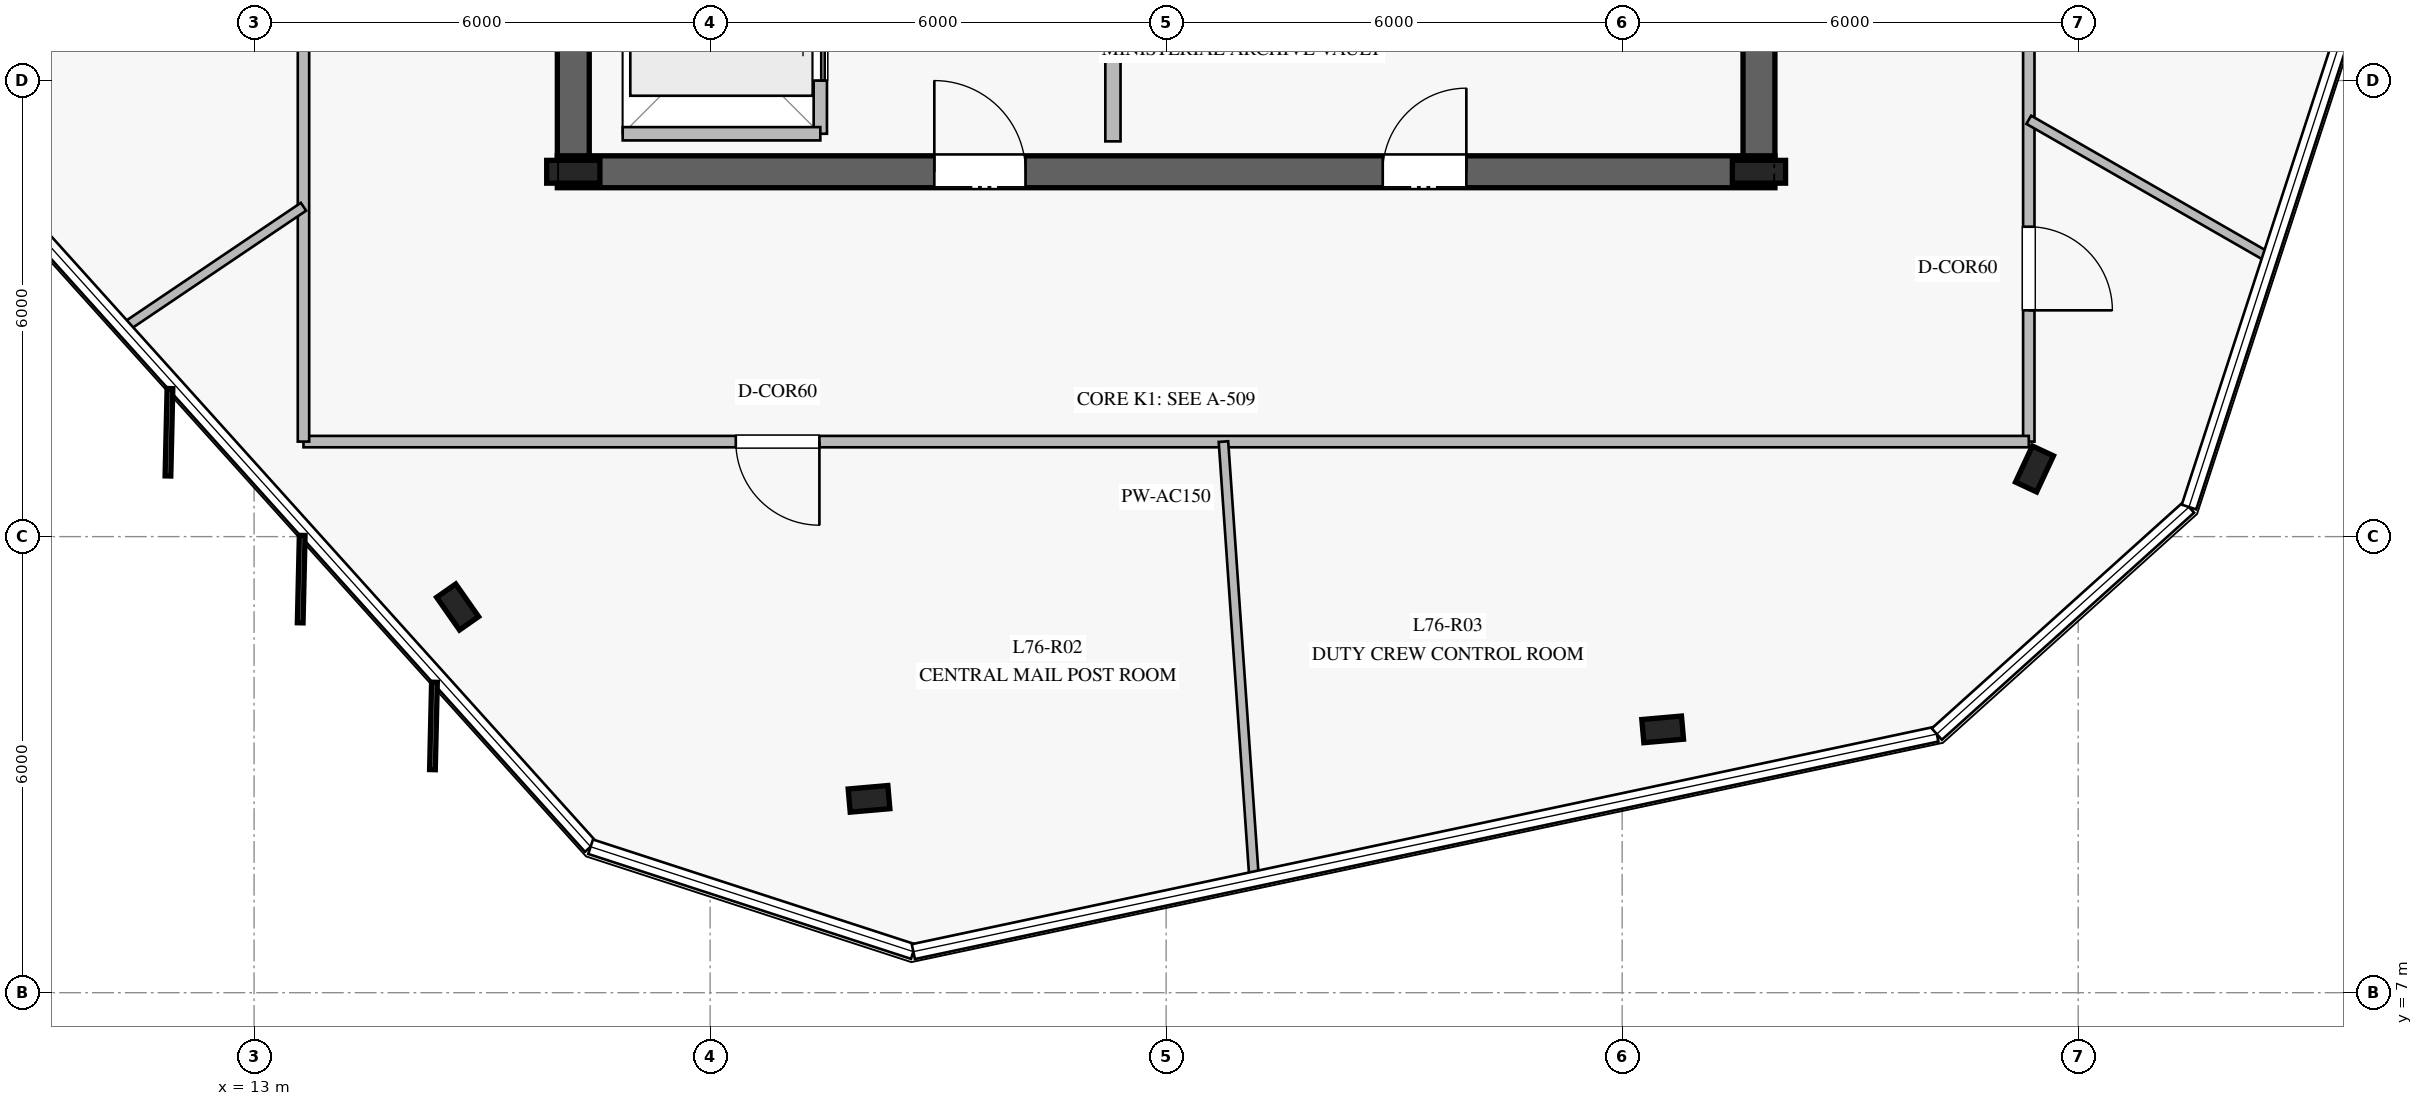
"""IFC4 building model, lengths in metres.
Left out: names, types, materials, properties, quantities, classifications, styles, units other than length and angle.
Written with IfcOpenShell. Run it as: python <this file> out.ifc"""

import sys

from ifc_helpers import new_model, si_unit, direction, frame, frame_2d, origin, origin_2d, place, context, subcontext, project, spatial, rectangle, i_section, extrude, element, fill, save


model = new_model("IFC4")
c1 = context("Model", 3, precision=1e-05, world=origin(), true_north=direction((0.0, 1.0)))
c2 = subcontext(c1, "Body", "Model", "MODEL_VIEW")
j1 = project(units=[si_unit("LENGTHUNIT", "METRE"), si_unit("PLANEANGLEUNIT", "RADIAN")], contexts=[c1])
p1 = place(None, origin())
s1 = spatial("IfcSite", under=j1, at=p1, CompositionType="ELEMENT")
p2 = place(p1, origin())
s2 = spatial("IfcBuilding", under=s1, at=p2, CompositionType="ELEMENT")
p3 = place(p2, frame((0.0, 0.0, 314.2)))
s3 = spatial("IfcBuildingStorey", under=s2, at=p3, CompositionType="ELEMENT", Elevation=314.2)
p4 = place(p3, frame((16.99, 17.8, 0.0), z_axis=(0.0, 0.0, 1.0), x_axis=(1.0, 0.0, 0.0)))
e1 = element("IfcWall", 1, at=p4, inside=s3, PredefinedType="SHEAR", context=c2, shape_type="SweptSolid", body=[
    extrude(rectangle(XDim=16.02, YDim=0.42, at=frame_2d((8.01, 0.0))), origin(), (0.0, 0.0, 1.0), 3.74),
])
p5 = place(p4, frame((4.96, 0.0, 0.0)))
e2 = element("IfcOpeningElement", 2, at=p5, cuts=e1, PredefinedType="OPENING", context=c2, shape_type="SweptSolid", body=[
    extrude(rectangle(XDim=1.2, YDim=2.25, at=frame_2d((0.6, 1.125))), frame((0.0, 0.22, 0.0), z_axis=(0.0, -1.0, 0.0), x_axis=(1.0, 0.0, 0.0)), (0.0, 0.0, 1.0), 0.44),
])
p6 = place(p4, frame((10.86, 0.0, 0.0)))
e3 = element("IfcOpeningElement", 3, at=p6, cuts=e1, PredefinedType="OPENING", context=c2, shape_type="SweptSolid", body=[
    extrude(rectangle(XDim=1.1, YDim=2.2, at=frame_2d((0.55, 1.1))), frame((0.0, 0.22, 0.0), z_axis=(0.0, -1.0, 0.0), x_axis=(1.0, 0.0, 0.0)), (0.0, 0.0, 1.0), 0.44),
])
p7 = place(p3, frame((17.2, 31.99, 0.0), z_axis=(0.0, 0.0, 1.0), x_axis=(0.0, -1.0, 0.0)))
e4 = element("IfcWall", 4, at=p7, inside=s3, PredefinedType="SHEAR", context=c2, shape_type="SweptSolid", body=[
    extrude(rectangle(XDim=13.98, YDim=0.42, at=frame_2d((6.99, 0.0))), origin(), (0.0, 0.0, 1.0), 3.74),
])
p8 = place(p7, frame((2.14, 0.0, 0.0)))
e5 = element("IfcOpeningElement", 5, at=p8, cuts=e4, PredefinedType="OPENING", context=c2, shape_type="SweptSolid", body=[
    extrude(rectangle(XDim=1.5, YDim=2.2, at=frame_2d((0.75, 1.1))), frame((0.0, 0.22, 0.0), z_axis=(0.0, -1.0, 0.0), x_axis=(1.0, 0.0, 0.0)), (0.0, 0.0, 1.0), 0.44),
])
p9 = place(p3, frame((32.8, 18.01, 0.0), z_axis=(0.0, 0.0, 1.0), x_axis=(0.0, 1.0, 0.0)))
e6 = element("IfcWall", 6, at=p9, inside=s3, PredefinedType="SHEAR", context=c2, shape_type="SweptSolid", body=[
    extrude(rectangle(XDim=13.98, YDim=0.42, at=frame_2d((6.99, 0.0))), origin(), (0.0, 0.0, 1.0), 3.74),
])
for number, where, z_axis, x_axis in (
    (7, (17.2, 17.8, 0.0), (0.0, 0.0, 1.0), (1.0, 0.0, 0.0)),
    (8, (32.8, 17.8, 0.0), (0.0, 0.0, 1.0), (1.0, 0.0, 0.0)),
):
    element("IfcColumn", number, at=place(p3, frame(where, z_axis=z_axis, x_axis=x_axis)), inside=s3, PredefinedType="COLUMN", context=c2, shape_type="SweptSolid", body=[
        extrude(i_section(OverallWidth=0.3, OverallDepth=0.7, WebThickness=0.017, FlangeThickness=0.032, at=origin_2d()), origin(), (0.0, 0.0, 1.0), 4.0),
    ])
for number, where, z_axis, x_axis in (
    (9, (15.678, 12.074, 0.0), (0.0, 0.0, 1.0), (-0.574, 0.819, 0.0)),
    (10, (21.091, 9.55, 0.0), (0.0, 0.0, 1.0), (0.996, 0.087, 0.0)),
    (11, (31.533, 10.464, 0.0), (0.0, 0.0, 1.0), (0.996, 0.087, 0.0)),
    (12, (36.425, 13.89, 0.0), (0.0, 0.0, 1.0), (0.423, 0.906, 0.0)),
):
    element("IfcColumn", number, at=place(p3, frame(where, z_axis=z_axis, x_axis=x_axis)), inside=s3, PredefinedType="COLUMN", context=c2, shape_type="SweptSolid", body=[
        extrude(i_section(OverallWidth=0.306, OverallDepth=0.524, WebThickness=0.021, FlangeThickness=0.04, at=origin_2d()), origin(), (0.0, 0.0, 1.0), 4.0),
    ])
p10 = place(p3, frame((24.3, 18.2, 0.0), z_axis=(0.0, 0.0, 1.0), x_axis=(0.0, 1.0, 0.0)))
e13 = element("IfcWall", 13, at=p10, inside=s3, PredefinedType="PARTITIONING", context=c2, shape_type="SweptSolid", body=[
    extrude(rectangle(XDim=5.15, YDim=0.2, at=frame_2d((2.575, 0.0))), origin(), (0.0, 0.0, 1.0), 3.74),
])
p11 = place(p3, frame((20.45, 18.3, 0.0), z_axis=(0.0, 0.0, 1.0), x_axis=(0.0, 1.0, 0.0)))
e14 = element("IfcWall", 14, at=p11, inside=s3, PredefinedType="PARTITIONING", context=c2, shape_type="SweptSolid", body=[
    extrude(rectangle(XDim=2.6, YDim=0.175, at=frame_2d((1.3, 0.0))), origin(), (0.0, 0.0, 1.0), 3.74),
])
p12 = place(p11, frame((0.7, 0.0, 0.0)))
e15 = element("IfcOpeningElement", 15, at=p12, cuts=e14, PredefinedType="OPENING", context=c2, shape_type="SweptSolid", body=[
    extrude(rectangle(XDim=1.2, YDim=2.2, at=frame_2d((0.6, 1.1))), frame((0.0, 0.098, 0.0), z_axis=(0.0, -1.0, 0.0), x_axis=(1.0, 0.0, 0.0)), (0.0, 0.0, 1.0), 0.195),
])
p13 = place(p3, frame((17.85, 18.3, 0.0), z_axis=(0.0, 0.0, 1.0), x_axis=(1.0, 0.0, 0.0)))
e16 = element("IfcWall", 16, at=p13, inside=s3, PredefinedType="PARTITIONING", context=c2, shape_type="SweptSolid", body=[
    extrude(rectangle(XDim=2.6, YDim=0.175, at=frame_2d((1.3, 0.0))), origin(), (0.0, 0.0, 1.0), 3.74),
])
p14 = place(p3, frame((36.35, 35.75, 0.0), z_axis=(0.0, 0.0, 1.0), x_axis=(0.0, -1.0, 0.0)))
e17 = element("IfcWall", 17, at=p14, inside=s3, PredefinedType="PARTITIONING", context=c2, shape_type="SweptSolid", body=[
    extrude(rectangle(XDim=21.5, YDim=0.15, at=frame_2d((10.75, 0.0))), origin(), (0.0, 0.0, 1.0), 3.24),
])
p15 = place(p14, frame((18.673, 0.0, 0.0)))
e18 = element("IfcOpeningElement", 18, at=p15, cuts=e17, PredefinedType="OPENING", context=c2, shape_type="SweptSolid", body=[
    extrude(rectangle(XDim=1.1, YDim=2.2, at=frame_2d((0.55, 1.1))), frame((0.0, 0.085, 0.0), z_axis=(0.0, -1.0, 0.0), x_axis=(1.0, 0.0, 0.0)), (0.0, 0.0, 1.0), 0.17),
])
p16 = place(p14, frame((10.163, 0.0, 0.0)))
e19 = element("IfcOpeningElement", 19, at=p16, cuts=e17, PredefinedType="OPENING", context=c2, shape_type="SweptSolid", body=[
    extrude(rectangle(XDim=1.1, YDim=2.2, at=frame_2d((0.55, 1.1))), frame((0.0, 0.085, 0.0), z_axis=(0.0, -1.0, 0.0), x_axis=(1.0, 0.0, 0.0)), (0.0, 0.0, 1.0), 0.17),
])
p17 = place(p3, frame((36.35, 14.25, 0.0), z_axis=(0.0, 0.0, 1.0), x_axis=(-1.0, 0.0, 0.0)))
e20 = element("IfcWall", 20, at=p17, inside=s3, PredefinedType="PARTITIONING", context=c2, shape_type="SweptSolid", body=[
    extrude(rectangle(XDim=22.7, YDim=0.15, at=frame_2d((11.35, 0.0))), origin(), (0.0, 0.0, 1.0), 3.24),
])
p18 = place(p17, frame((15.912, 0.0, 0.0)))
e21 = element("IfcOpeningElement", 21, at=p18, cuts=e20, PredefinedType="OPENING", context=c2, shape_type="SweptSolid", body=[
    extrude(rectangle(XDim=1.1, YDim=2.2, at=frame_2d((0.55, 1.1))), frame((0.0, 0.085, 0.0), z_axis=(0.0, -1.0, 0.0), x_axis=(1.0, 0.0, 0.0)), (0.0, 0.0, 1.0), 0.17),
])
p19 = place(p3, frame((13.65, 14.25, 0.0), z_axis=(0.0, 0.0, 1.0), x_axis=(0.0, 1.0, 0.0)))
e22 = element("IfcWall", 22, at=p19, inside=s3, PredefinedType="PARTITIONING", context=c2, shape_type="SweptSolid", body=[
    extrude(rectangle(XDim=21.5, YDim=0.15, at=frame_2d((10.75, 0.0))), origin(), (0.0, 0.0, 1.0), 3.24),
])
p20 = place(p19, frame((8.197, 0.0, 0.0)))
e23 = element("IfcOpeningElement", 23, at=p20, cuts=e22, PredefinedType="OPENING", context=c2, shape_type="SweptSolid", body=[
    extrude(rectangle(XDim=1.1, YDim=2.2, at=frame_2d((0.55, 1.1))), frame((0.0, 0.085, 0.0), z_axis=(0.0, -1.0, 0.0), x_axis=(1.0, 0.0, 0.0)), (0.0, 0.0, 1.0), 0.17),
])
p21 = place(p3, frame((13.65, 17.34, 0.0), z_axis=(0.0, 0.0, 1.0), x_axis=(-0.828847677001, -0.559474332146, 0.0)))
e24 = element("IfcWall", 24, at=p21, inside=s3, PredefinedType="PARTITIONING", context=c2, shape_type="SweptSolid", body=[
    extrude(rectangle(XDim=2.839, YDim=0.125, at=frame_2d((1.419, 0.0))), origin(), (0.0, 0.0, 1.0), 3.24),
])
p22 = place(p3, frame((25.754, 14.25, 0.0), z_axis=(0.0, 0.0, 1.0), x_axis=(0.070038089252, -0.99754431784, 0.0)))
e25 = element("IfcWall", 25, at=p22, inside=s3, PredefinedType="PARTITIONING", context=c2, shape_type="SweptSolid", body=[
    extrude(rectangle(XDim=5.755, YDim=0.125, at=frame_2d((2.877, 0.0))), origin(), (0.0, 0.0, 1.0), 3.24),
])
p23 = place(p3, frame((36.35, 18.484, 0.0), z_axis=(0.0, 0.0, 1.0), x_axis=(0.867242910884, -0.497885261401, 0.0)))
e26 = element("IfcWall", 26, at=p23, inside=s3, PredefinedType="PARTITIONING", context=c2, shape_type="SweptSolid", body=[
    extrude(rectangle(XDim=3.641, YDim=0.125, at=frame_2d((1.821, 0.0))), origin(), (0.0, 0.0, 1.0), 3.24),
])
p24 = place(p5, origin())
e27 = element("IfcDoor", 27, at=p24, inside=s3, OperationType="SINGLE_SWING_LEFT", PredefinedType="DOOR", context=c2, shape_type="SweptSolid", body=[
    extrude(rectangle(XDim=1.2, YDim=2.25, at=frame_2d((0.6, 1.125))), frame((0.0, 0.025, 0.0), z_axis=(0.0, -1.0, 0.0), x_axis=(1.0, 0.0, 0.0)), (0.0, 0.0, 1.0), 0.05),
])
fill(e2, e27)
p25 = place(p6, origin())
e28 = element("IfcDoor", 28, at=p25, inside=s3, OperationType="SINGLE_SWING_RIGHT", PredefinedType="DOOR", context=c2, shape_type="SweptSolid", body=[
    extrude(rectangle(XDim=1.1, YDim=2.2, at=frame_2d((0.55, 1.1))), frame((0.0, 0.025, 0.0), z_axis=(0.0, -1.0, 0.0), x_axis=(1.0, 0.0, 0.0)), (0.0, 0.0, 1.0), 0.05),
])
fill(e3, e28)
p26 = place(p12, origin())
e29 = element("IfcDoor", 29, at=p26, inside=s3, OperationType="DOUBLE_DOOR_SLIDING", PredefinedType="DOOR", context=c2, shape_type="SweptSolid", body=[
    extrude(rectangle(XDim=1.2, YDim=2.2, at=frame_2d((0.6, 1.1))), frame((0.0, 0.025, 0.0), z_axis=(0.0, -1.0, 0.0), x_axis=(1.0, 0.0, 0.0)), (0.0, 0.0, 1.0), 0.05),
])
fill(e15, e29)
p27 = place(p18, origin())
e30 = element("IfcDoor", 30, at=p27, inside=s3, OperationType="SINGLE_SWING_LEFT", PredefinedType="DOOR", context=c2, shape_type="SweptSolid", body=[
    extrude(rectangle(XDim=1.1, YDim=2.2, at=frame_2d((0.55, 1.1))), frame((0.0, 0.025, 0.0), z_axis=(0.0, -1.0, 0.0), x_axis=(1.0, 0.0, 0.0)), (0.0, 0.0, 1.0), 0.05),
])
fill(e21, e30)
p28 = place(p15, origin())
e31 = element("IfcDoor", 31, at=p28, inside=s3, OperationType="SINGLE_SWING_RIGHT", PredefinedType="DOOR", context=c2, shape_type="SweptSolid", body=[
    extrude(rectangle(XDim=1.1, YDim=2.2, at=frame_2d((0.55, 1.1))), frame((0.0, 0.025, 0.0), z_axis=(0.0, -1.0, 0.0), x_axis=(1.0, 0.0, 0.0)), (0.0, 0.0, 1.0), 0.05),
])
fill(e18, e31)
save(model, sys.argv[1])
